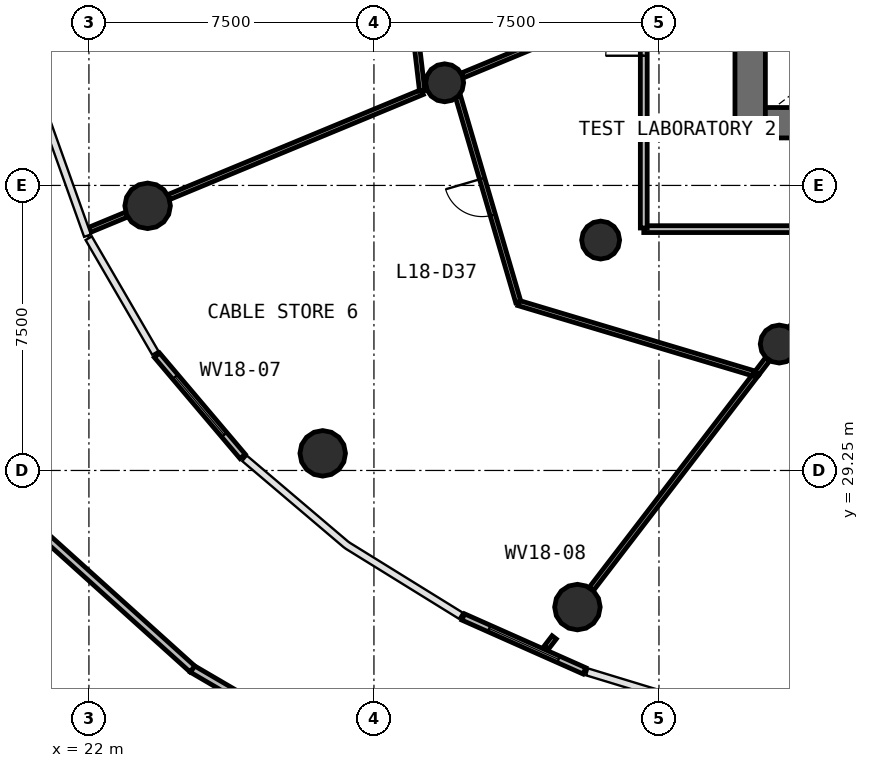
"""IFC4 building model, lengths in metres.
Left out: names, types, materials, properties, quantities, classifications, styles, units other than length and angle.
Written with IfcOpenShell. Run it as: python <this file> out.ifc"""

import sys

from ifc_helpers import new_model, si_unit, direction, frame, frame_2d, origin, origin_2d, place, context, subcontext, project, spatial, rectangle, circle, extrude, source, transform, mapped, element, fill, save


model = new_model("IFC4")
c1 = context("Model", 3, precision=1e-05, world=origin(), true_north=direction((0.0, 1.0)))
c2 = subcontext(c1, "Body", "Model", "MODEL_VIEW")
j1 = project(units=[si_unit("LENGTHUNIT", "METRE"), si_unit("PLANEANGLEUNIT", "RADIAN")], contexts=[c1])
p1 = place(None, origin())
s1 = spatial("IfcSite", under=j1, at=p1, CompositionType="ELEMENT")
p2 = place(p1, origin())
s2 = spatial("IfcBuilding", under=s1, at=p2, CompositionType="ELEMENT")
p3 = place(p2, frame((0.0, 0.0, 79.8)))
s3 = spatial("IfcBuildingStorey", under=s2, at=p3, CompositionType="ELEMENT", Elevation=79.8)
p4 = place(p3, frame((39.4, 58.0, 0.0), z_axis=(0.0, 0.0, 1.0), x_axis=(0.0, -1.0, 0.0)))
e1 = element("IfcWall", 1, at=p4, inside=s3, PredefinedType="SHEAR", context=c2, shape_type="SweptSolid", body=[
    extrude(rectangle(XDim=20.0, YDim=0.8, at=frame_2d((10.0, 0.0))), origin(), (0.0, 0.0, 1.0), 4.1),
])
p5 = place(p4, frame((9.1, 0.0, 0.0)))
e2 = element("IfcOpeningElement", 2, at=p5, cuts=e1, PredefinedType="OPENING", context=c2, shape_type="SweptSolid", body=[
    extrude(rectangle(XDim=1.8, YDim=2.1, at=frame_2d((0.9, 1.05))), frame((0.0, 0.41, 0.0), z_axis=(0.0, -1.0, 0.0), x_axis=(1.0, 0.0, 0.0)), (0.0, 0.0, 1.0), 0.82),
])
p6 = place(p3, frame((39.8, 38.4, 0.0), z_axis=(0.0, 0.0, 1.0), x_axis=(1.0, 0.0, 0.0)))
e3 = element("IfcWall", 3, at=p6, inside=s3, PredefinedType="SHEAR", context=c2, shape_type="SweptSolid", body=[
    extrude(rectangle(XDim=24.4, YDim=0.8, at=frame_2d((12.2, 0.0))), origin(), (0.0, 0.0, 1.0), 4.1),
])
p7 = place(p6, frame((21.65, 0.0, 0.0)))
e4 = element("IfcOpeningElement", 4, at=p7, cuts=e3, PredefinedType="OPENING", context=c2, shape_type="SweptSolid", body=[
    extrude(rectangle(XDim=1.1, YDim=2.1, at=frame_2d((0.55, 1.05))), frame((0.0, 0.41, 0.0), z_axis=(0.0, -1.0, 0.0), x_axis=(1.0, 0.0, 0.0)), (0.0, 0.0, 1.0), 0.82),
])
p8 = place(p6, frame((2.15, 0.0, 0.0)))
e5 = element("IfcOpeningElement", 5, at=p8, cuts=e3, PredefinedType="OPENING", context=c2, shape_type="SweptSolid", body=[
    extrude(rectangle(XDim=1.1, YDim=2.1, at=frame_2d((0.55, 1.05))), frame((0.0, 0.41, 0.0), z_axis=(0.0, -1.0, 0.0), x_axis=(1.0, 0.0, 0.0)), (0.0, 0.0, 1.0), 0.82),
])
m1 = source(origin(), c2, "Body", "SweptSolid", [
    extrude(circle(Radius=0.6, at=origin_2d()), origin(), (0.0, 0.0, 1.0), 4.5),
])
for number, where, z_axis, x_axis in (
    (6, (23.544, 36.213, -0.4), (0.0, 0.0, 1.0), (1.0, 0.0, 0.0)),
    (7, (28.152, 29.701, -0.4), (0.0, 0.0, 1.0), (1.0, 0.0, 0.0)),
    (8, (34.854, 25.655, -0.4), (0.0, 0.0, 1.0), (1.0, 0.0, 0.0)),
):
    element("IfcColumn", number, at=place(p3, frame(where, z_axis=z_axis, x_axis=x_axis)), inside=s3, PredefinedType="COLUMN", context=c2, shape_type="MappedRepresentation", body=[
        mapped(m1, transform((0.0, 0.0, 0.0), scale=1.0)),
    ])
m2 = source(origin(), c2, "Body", "SweptSolid", [
    extrude(circle(Radius=0.5, at=origin_2d()), origin(), (0.0, 0.0, 1.0), 4.1),
])
for number, where, z_axis, x_axis in (
    (9, (31.361, 39.451, 0.0), (0.0, 0.0, 1.0), (1.0, 0.0, 0.0)),
    (10, (35.465, 35.312, 0.0), (0.0, 0.0, 1.0), (1.0, 0.0, 0.0)),
    (11, (40.165, 32.576, 0.0), (0.0, 0.0, 1.0), (1.0, 0.0, 0.0)),
):
    element("IfcColumn", number, at=place(p3, frame(where, z_axis=z_axis, x_axis=x_axis)), inside=s3, PredefinedType="COLUMN", context=c2, shape_type="MappedRepresentation", body=[
        mapped(m2, transform((0.0, 0.0, 0.0), scale=1.0)),
    ])
p9 = place(p3, frame((23.789, 32.283, 0.0), z_axis=(0.0, 0.0, 1.0), x_axis=(0.646174369763, -0.763189808541, 0.0)))
e12 = element("IfcWall", 12, at=p9, inside=s3, PredefinedType="STANDARD", context=c2, shape_type="SweptSolid", body=[
    extrude(rectangle(XDim=3.489, YDim=0.18, at=frame_2d((1.744, 0.0))), origin(), (0.0, 0.0, 1.0), 3.7),
])
p10 = place(p9, frame((0.744, 0.0, 0.9)))
e13 = element("IfcOpeningElement", 13, at=p10, cuts=e12, PredefinedType="OPENING", context=c2, shape_type="SweptSolid", body=[
    extrude(rectangle(XDim=2.0, YDim=2.2, at=frame_2d((1.0, 1.1))), frame((0.0, 0.1, 0.0), z_axis=(0.0, -1.0, 0.0), x_axis=(1.0, 0.0, 0.0)), (0.0, 0.0, 1.0), 0.2),
])
p11 = place(p3, frame((31.85, 25.395, 0.0), z_axis=(0.0, 0.0, 1.0), x_axis=(0.913727880344, -0.406326667451, 0.0)))
e14 = element("IfcWall", 14, at=p11, inside=s3, PredefinedType="STANDARD", context=c2, shape_type="SweptSolid", body=[
    extrude(rectangle(XDim=3.49, YDim=0.18, at=frame_2d((1.745, 0.0))), origin(), (0.0, 0.0, 1.0), 3.448),
])
p12 = place(p11, frame((0.745, 0.0, 0.9)))
e15 = element("IfcOpeningElement", 15, at=p12, cuts=e14, PredefinedType="OPENING", context=c2, shape_type="SweptSolid", body=[
    extrude(rectangle(XDim=2.0, YDim=2.2, at=frame_2d((1.0, 1.1))), frame((0.0, 0.1, 0.0), z_axis=(0.0, -1.0, 0.0), x_axis=(1.0, 0.0, 0.0)), (0.0, 0.0, 1.0), 0.2),
])
p13 = place(p3, frame((29.723, 21.104, 0.0), z_axis=(0.0, 0.0, 1.0), x_axis=(-0.863358110141, 0.504591690037, 0.0)))
e16 = element("IfcWall", 16, at=p13, inside=s3, PredefinedType="PARAPET", context=c2, shape_type="SweptSolid", body=[
    extrude(rectangle(XDim=5.791, YDim=0.2, at=frame_2d((2.896, 0.0))), origin(), (0.0, 0.0, 1.0), 1.1),
])
p14 = place(p3, frame((24.724, 24.026, 0.0), z_axis=(0.0, 0.0, 1.0), x_axis=(-0.742889236772, 0.669414357396, 0.0)))
e17 = element("IfcWall", 17, at=p14, inside=s3, PredefinedType="PARAPET", context=c2, shape_type="SweptSolid", body=[
    extrude(rectangle(XDim=5.788, YDim=0.2, at=frame_2d((2.894, 0.0))), origin(), (0.0, 0.0, 1.0), 1.1),
])
p15 = place(p3, frame((67.4, 35.6, 0.0), z_axis=(0.0, 0.0, 1.0), x_axis=(-1.0, 0.0, 0.0)))
e18 = element("IfcWall", 18, at=p15, inside=s3, PredefinedType="PARTITIONING", context=c2, shape_type="SweptSolid", body=[
    extrude(rectangle(XDim=30.8, YDim=0.18, at=frame_2d((15.4, 0.0))), origin(), (0.0, 0.0, 1.0), 2.9),
])
p16 = place(p15, frame((17.35, 0.0, 0.0)))
e19 = element("IfcOpeningElement", 19, at=p16, cuts=e18, PredefinedType="OPENING", context=c2, shape_type="SweptSolid", body=[
    extrude(rectangle(XDim=1.0, YDim=2.1, at=frame_2d((0.5, 1.05))), frame((0.0, 0.1, 0.0), z_axis=(0.0, -1.0, 0.0), x_axis=(1.0, 0.0, 0.0)), (0.0, 0.0, 1.0), 0.2),
])
p17 = place(p15, frame((14.95, 0.0, 0.0)))
e20 = element("IfcOpeningElement", 20, at=p17, cuts=e18, PredefinedType="OPENING", context=c2, shape_type="SweptSolid", body=[
    extrude(rectangle(XDim=1.0, YDim=2.1, at=frame_2d((0.5, 1.05))), frame((0.0, 0.1, 0.0), z_axis=(0.0, -1.0, 0.0), x_axis=(1.0, 0.0, 0.0)), (0.0, 0.0, 1.0), 0.2),
])
p18 = place(p3, frame((36.6, 35.63, 0.0), z_axis=(0.0, 0.0, 1.0), x_axis=(0.0, 1.0, 0.0)))
e21 = element("IfcWall", 21, at=p18, inside=s3, PredefinedType="PARTITIONING", context=c2, shape_type="SweptSolid", body=[
    extrude(rectangle(XDim=23.583, YDim=0.18, at=frame_2d((11.791, 0.0))), origin(), (0.0, 0.0, 1.0), 2.9),
])
p19 = place(p18, frame((11.333, 0.0, 0.0)))
e22 = element("IfcOpeningElement", 22, at=p19, cuts=e21, PredefinedType="OPENING", context=c2, shape_type="SweptSolid", body=[
    extrude(rectangle(XDim=1.0, YDim=2.1, at=frame_2d((0.5, 1.05))), frame((0.0, 0.1, 0.0), z_axis=(0.0, -1.0, 0.0), x_axis=(1.0, 0.0, 0.0)), (0.0, 0.0, 1.0), 0.2),
])
p20 = place(p18, frame((4.532, 0.0, 0.0)))
e23 = element("IfcOpeningElement", 23, at=p20, cuts=e21, PredefinedType="OPENING", context=c2, shape_type="SweptSolid", body=[
    extrude(rectangle(XDim=1.0, YDim=2.1, at=frame_2d((0.5, 1.05))), frame((0.0, 0.1, 0.0), z_axis=(0.0, -1.0, 0.0), x_axis=(1.0, 0.0, 0.0)), (0.0, 0.0, 1.0), 0.2),
])
p21 = place(p3, frame((30.773, 39.208, 0.0), z_axis=(0.0, 0.0, 1.0), x_axis=(-0.923868434379, -0.382710224528, 0.0)))
e24 = element("IfcWall", 24, at=p21, inside=s3, PredefinedType="PARTITIONING", context=c2, shape_type="SweptSolid", body=[
    extrude(rectangle(XDim=7.219, YDim=0.14, at=frame_2d((3.609, 0.0))), origin(), (0.0, 0.0, 1.0), 2.9),
])
p22 = place(p3, frame((39.558, 31.785, 0.0), z_axis=(0.0, 0.0, 1.0), x_axis=(-0.608756067586, -0.793357454226, 0.0)))
e25 = element("IfcWall", 25, at=p22, inside=s3, PredefinedType="PARTITIONING", context=c2, shape_type="SweptSolid", body=[
    extrude(rectangle(XDim=7.122, YDim=0.14, at=frame_2d((3.561, 0.0))), origin(), (0.0, 0.0, 1.0), 2.9),
])
p23 = place(p3, frame((33.306, 33.656, 0.0), z_axis=(0.0, 0.0, 1.0), x_axis=(0.958019823731, -0.286701966054, 0.0)))
e26 = element("IfcWall", 26, at=p23, inside=s3, PredefinedType="PARTITIONING", context=c2, shape_type="SweptSolid", body=[
    extrude(rectangle(XDim=6.45, YDim=0.14, at=frame_2d((3.225, 0.0))), origin(), (0.0, 0.0, 1.0), 2.9),
])
p24 = place(p3, frame((30.769, 39.237, 0.0), z_axis=(0.0, 0.0, 1.0), x_axis=(-0.116719162139, 0.993164959707, 0.0)))
e27 = element("IfcWall", 27, at=p24, inside=s3, PredefinedType="PARTITIONING", context=c2, shape_type="SweptSolid", body=[
    extrude(rectangle(XDim=5.917, YDim=0.14, at=frame_2d((2.959, 0.0))), origin(), (0.0, 0.0, 1.0), 2.9),
])
p25 = place(p24, frame((2.467, 0.0, 0.0)))
e28 = element("IfcOpeningElement", 28, at=p25, cuts=e27, PredefinedType="OPENING", context=c2, shape_type="SweptSolid", body=[
    extrude(rectangle(XDim=1.0, YDim=2.1, at=frame_2d((0.5, 1.05))), frame((0.0, 0.08, 0.0), z_axis=(0.0, -1.0, 0.0), x_axis=(1.0, 0.0, 0.0)), (0.0, 0.0, 1.0), 0.16),
])
p26 = place(p3, frame((33.297, 33.684, 0.0), z_axis=(0.0, 0.0, 1.0), x_axis=(-0.281401194001, 0.959590208378, 0.0)))
e29 = element("IfcWall", 29, at=p26, inside=s3, PredefinedType="PARTITIONING", context=c2, shape_type="SweptSolid", body=[
    extrude(rectangle(XDim=5.632, YDim=0.14, at=frame_2d((2.816, 0.0))), origin(), (0.0, 0.0, 1.0), 2.9),
])
p27 = place(p26, frame((2.382, 0.0, 0.0)))
e30 = element("IfcOpeningElement", 30, at=p27, cuts=e29, PredefinedType="OPENING", context=c2, shape_type="SweptSolid", body=[
    extrude(rectangle(XDim=1.0, YDim=2.1, at=frame_2d((0.5, 1.05))), frame((0.0, 0.08, 0.0), z_axis=(0.0, -1.0, 0.0), x_axis=(1.0, 0.0, 0.0)), (0.0, 0.0, 1.0), 0.16),
])
p28 = place(p3, frame((36.51, 41.584, 0.0), z_axis=(0.0, 0.0, 1.0), x_axis=(-0.923890025086, -0.382658100067, 0.0)))
e31 = element("IfcWall", 31, at=p28, inside=s3, PredefinedType="PARTITIONING", context=c2, shape_type="SweptSolid", body=[
    extrude(rectangle(XDim=5.068, YDim=0.14, at=frame_2d((2.534, 0.0))), origin(), (0.0, 0.0, 1.0), 2.9),
])
p29 = place(p3, frame((42.416, 35.51, 0.0), z_axis=(0.0, 0.0, 1.0), x_axis=(-0.60874605662, -0.793365135703, 0.0)))
e32 = element("IfcWall", 32, at=p29, inside=s3, PredefinedType="PARTITIONING", context=c2, shape_type="SweptSolid", body=[
    extrude(rectangle(XDim=3.194, YDim=0.14, at=frame_2d((1.597, 0.0))), origin(), (0.0, 0.0, 1.0), 2.9),
])
p30 = place(p3, frame((22.986, 35.982, 0.0), z_axis=(0.0, 0.0, 1.0), x_axis=(-0.923884060829, -0.382672499857, 0.0)))
e33 = element("IfcWall", 33, at=p30, inside=s3, PredefinedType="PARTITIONING", context=c2, shape_type="SweptSolid", body=[
    extrude(rectangle(XDim=1.053, YDim=0.14, at=frame_2d((0.527, 0.0))), origin(), (0.0, 0.0, 1.0), 2.9),
])
p31 = place(p3, frame((34.243, 24.858, 0.0), z_axis=(0.0, 0.0, 1.0), x_axis=(-0.609050290179, -0.793131605746, 0.0)))
e34 = element("IfcWall", 34, at=p31, inside=s3, PredefinedType="PARTITIONING", context=c2, shape_type="SweptSolid", body=[
    extrude(rectangle(XDim=0.34, YDim=0.14, at=frame_2d((0.17, 0.0))), origin(), (0.0, 0.0, 1.0), 2.9),
])
p32 = place(p3, frame((39.858, 32.176, 0.0), z_axis=(0.0, 0.0, 1.0), x_axis=(-0.608895872942, -0.793250159732, 0.0)))
e35 = element("IfcWall", 35, at=p32, inside=s3, PredefinedType="PARTITIONING", context=c2, shape_type="SweptSolid", body=[
    extrude(rectangle(XDim=0.464, YDim=0.14, at=frame_2d((0.232, 0.0))), origin(), (0.0, 0.0, 1.0), 2.9),
])
m3 = source(origin(), c2, "Body", "SweptSolid", [
    extrude(rectangle(XDim=2.0, YDim=2.2, at=frame_2d((1.0, 1.1))), frame((0.0, 0.03, 0.0), z_axis=(0.0, -1.0, 0.0), x_axis=(1.0, 0.0, 0.0)), (0.0, 0.0, 1.0), 0.06),
])
p33 = place(p10, origin())
e36 = element("IfcWindow", 36, at=p33, inside=s3, PartitioningType="SINGLE_PANEL", PredefinedType="WINDOW", context=c2, shape_type="MappedRepresentation", body=[
    mapped(m3, transform((0.0, 0.0, 0.0), scale=1.0)),
])
fill(e13, e36)
p34 = place(p12, origin())
e37 = element("IfcWindow", 37, at=p34, inside=s3, PartitioningType="SINGLE_PANEL", PredefinedType="WINDOW", context=c2, shape_type="MappedRepresentation", body=[
    mapped(m3, transform((0.0, 0.0, 0.0), scale=1.0)),
])
fill(e15, e37)
m4 = source(origin(), c2, "Body", "SweptSolid", [
    extrude(rectangle(XDim=1.0, YDim=2.1, at=frame_2d((0.5, 1.05))), frame((0.0, 0.025, 0.0), z_axis=(0.0, -1.0, 0.0), x_axis=(1.0, 0.0, 0.0)), (0.0, 0.0, 1.0), 0.05),
])
p35 = place(p20, origin())
e38 = element("IfcDoor", 38, at=p35, inside=s3, OperationType="SINGLE_SWING_LEFT", PredefinedType="DOOR", context=c2, shape_type="MappedRepresentation", body=[
    mapped(m4, transform((0.0, 0.0, 0.0), scale=1.0)),
])
fill(e23, e38)
p36 = place(p27, origin())
e39 = element("IfcDoor", 39, at=p36, inside=s3, OperationType="SINGLE_SWING_RIGHT", PredefinedType="DOOR", context=c2, shape_type="MappedRepresentation", body=[
    mapped(m4, transform((0.0, 0.0, 0.0), scale=1.0)),
])
fill(e30, e39)
save(model, sys.argv[1])
